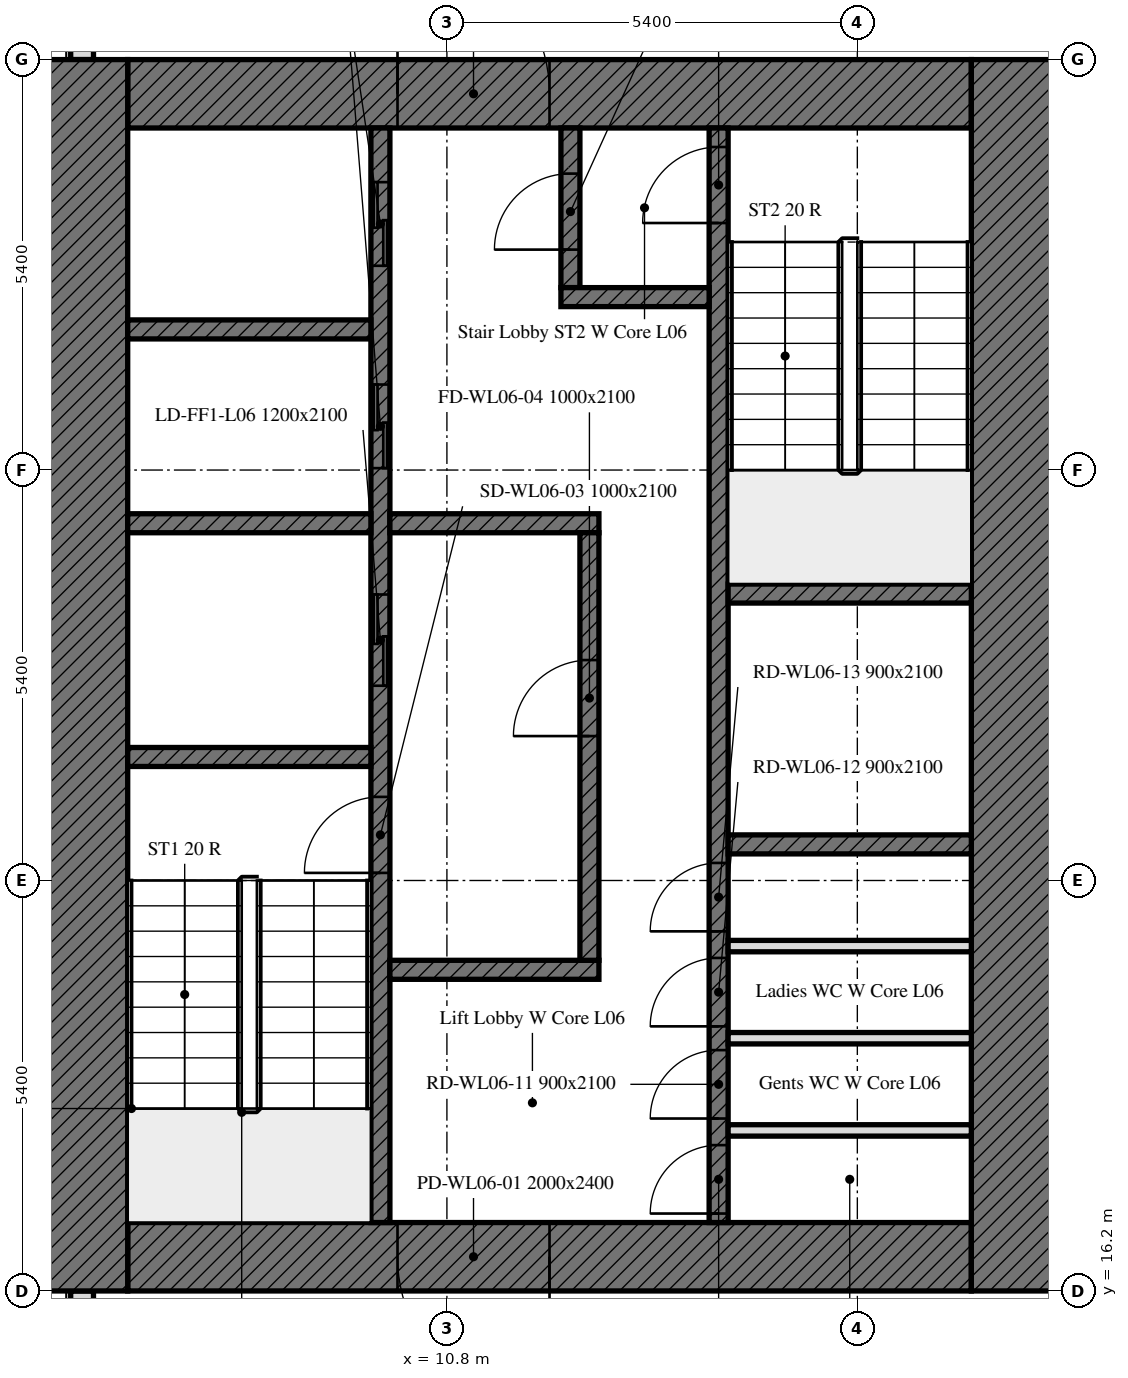
"""IFC4 building model, lengths in metres.
Left out: names, types, materials, properties, quantities, classifications, styles, units other than length and angle.
Written with IfcOpenShell. Run it as: python <this file> out.ifc"""

import sys

from ifc_helpers import new_model, si_unit, direction, frame, frame_2d, origin, place, context, subcontext, project, spatial, rectangle, extrude, element, fill, save


model = new_model("IFC4")
c1 = context("Model", 3, precision=1e-05, world=origin(), true_north=direction((0.0, 1.0)))
c2 = subcontext(c1, "Body", "Model", "MODEL_VIEW")
j1 = project(units=[si_unit("LENGTHUNIT", "METRE"), si_unit("PLANEANGLEUNIT", "RADIAN")], contexts=[c1])
p1 = place(None, origin())
s1 = spatial("IfcSite", under=j1, at=p1, CompositionType="ELEMENT")
p2 = place(p1, origin())
s2 = spatial("IfcBuilding", under=s1, at=p2, CompositionType="ELEMENT")
p3 = place(p2, frame((0.0, 0.0, 33.6)))
s3 = spatial("IfcBuildingStorey", under=s2, at=p3, CompositionType="ELEMENT", Elevation=33.6)
p4 = place(p3, frame((6.0, 37.614, 0.0), z_axis=(0.0, 0.0, 1.0), x_axis=(0.0, -1.0, 0.0)))
e1 = element("IfcWall", 1, at=p4, inside=s3, PredefinedType="SOLIDWALL", context=c2, shape_type="SweptSolid", body=[
    extrude(rectangle(XDim=5.214, YDim=0.3, at=frame_2d((2.607, 0.0))), origin(), (0.0, 0.0, 1.0), 3.5),
])
p5 = place(p4, frame((0.714, 0.0, 0.0)))
e2 = element("IfcOpeningElement", 2, at=p5, cuts=e1, PredefinedType="OPENING", context=c2, shape_type="SweptSolid", body=[
    extrude(rectangle(XDim=1.2, YDim=2.4, at=frame_2d((0.6, 1.2))), frame((0.0, 0.16, 0.0), z_axis=(0.0, -1.0, 0.0), x_axis=(1.0, 0.0, 0.0)), (0.0, 0.0, 1.0), 0.32),
])
p6 = place(p3, frame((6.0, 16.2, 0.0), z_axis=(0.0, 0.0, 1.0), x_axis=(0.0, -1.0, 0.0)))
e3 = element("IfcWall", 3, at=p6, inside=s3, PredefinedType="SOLIDWALL", context=c2, shape_type="SweptSolid", body=[
    extrude(rectangle(XDim=10.614, YDim=0.3, at=frame_2d((5.307, 0.0))), origin(), (0.0, 0.0, 1.0), 3.5),
])
p7 = place(p6, frame((3.3, 0.0, 0.0)))
e4 = element("IfcOpeningElement", 4, at=p7, cuts=e3, PredefinedType="OPENING", context=c2, shape_type="SweptSolid", body=[
    extrude(rectangle(XDim=1.2, YDim=2.4, at=frame_2d((0.6, 1.2))), frame((0.0, 0.16, 0.0), z_axis=(0.0, -1.0, 0.0), x_axis=(1.0, 0.0, 0.0)), (0.0, 0.0, 1.0), 0.32),
])
p8 = place(p6, frame((7.2, 0.0, 0.0)))
e5 = element("IfcOpeningElement", 5, at=p8, cuts=e3, PredefinedType="OPENING", context=c2, shape_type="SweptSolid", body=[
    extrude(rectangle(XDim=1.8, YDim=2.4, at=frame_2d((0.9, 1.2))), frame((0.0, 0.16, 0.0), z_axis=(0.0, -1.0, 0.0), x_axis=(1.0, 0.0, 0.0)), (0.0, 0.0, 1.0), 0.32),
])
p9 = place(p3, frame((17.7, 16.65, 0.0), z_axis=(0.0, 0.0, 1.0), x_axis=(-1.0, 0.0, 0.0)))
e6 = element("IfcWall", 6, at=p9, inside=s3, PredefinedType="SOLIDWALL", context=c2, shape_type="SweptSolid", body=[
    extrude(rectangle(XDim=11.1, YDim=0.9, at=frame_2d((5.55, 0.0))), origin(), (0.0, 0.0, 1.0), 3.5),
])
p10 = place(p9, frame((5.55, 0.0, 0.0)))
e7 = element("IfcOpeningElement", 7, at=p10, cuts=e6, PredefinedType="OPENING", context=c2, shape_type="SweptSolid", body=[
    extrude(rectangle(XDim=2.0, YDim=2.4, at=frame_2d((1.0, 1.2))), frame((0.0, 0.45, 0.0), z_axis=(0.0, -1.0, 0.0), x_axis=(1.0, 0.0, 0.0)), (0.0, 0.0, 1.0), 0.9),
])
p11 = place(p3, frame((6.6, 31.95, 0.0), z_axis=(0.0, 0.0, 1.0), x_axis=(1.0, 0.0, 0.0)))
e8 = element("IfcWall", 8, at=p11, inside=s3, PredefinedType="SOLIDWALL", context=c2, shape_type="SweptSolid", body=[
    extrude(rectangle(XDim=11.1, YDim=0.9, at=frame_2d((5.55, 0.0))), origin(), (0.0, 0.0, 1.0), 3.5),
])
p12 = place(p11, frame((3.55, 0.0, 0.0)))
e9 = element("IfcOpeningElement", 9, at=p12, cuts=e8, PredefinedType="OPENING", context=c2, shape_type="SweptSolid", body=[
    extrude(rectangle(XDim=2.0, YDim=2.4, at=frame_2d((1.0, 1.2))), frame((0.0, 0.45, 0.0), z_axis=(0.0, -1.0, 0.0), x_axis=(1.0, 0.0, 0.0)), (0.0, 0.0, 1.0), 0.9),
])
for number, where, z_axis, x_axis in (
    (10, (6.0, 16.2, 0.0), (0.0, 0.0, 1.0), (0.0, 1.0, 0.0)),
    (11, (18.3, 32.4, 0.0), (0.0, 0.0, 1.0), (0.0, -1.0, 0.0)),
):
    element("IfcWall", number, at=place(p3, frame(where, z_axis=z_axis, x_axis=x_axis)), inside=s3, PredefinedType="SOLIDWALL", context=c2, shape_type="SweptSolid", body=[
        extrude(rectangle(XDim=16.2, YDim=1.2, at=frame_2d((8.1, 0.0))), origin(), (0.0, 0.0, 1.0), 3.5),
    ])
p13 = place(p3, frame((9.925, 17.1, 0.0), z_axis=(0.0, 0.0, 1.0), x_axis=(0.0, 1.0, 0.0)))
e12 = element("IfcWall", 12, at=p13, inside=s3, PredefinedType="SOLIDWALL", context=c2, shape_type="SweptSolid", body=[
    extrude(rectangle(XDim=14.4, YDim=0.25, at=frame_2d((7.2, 0.0))), origin(), (0.0, 0.0, 1.0), 3.5),
])
p14 = place(p13, frame((4.6, 0.0, 0.0)))
e13 = element("IfcOpeningElement", 13, at=p14, cuts=e12, PredefinedType="OPENING", context=c2, shape_type="SweptSolid", body=[
    extrude(rectangle(XDim=1.0, YDim=2.1, at=frame_2d((0.5, 1.05))), frame((0.0, 0.125, 0.0), z_axis=(0.0, -1.0, 0.0), x_axis=(1.0, 0.0, 0.0)), (0.0, 0.0, 1.0), 0.25),
])
p15 = place(p13, frame((7.062, 0.0, 0.0)))
e14 = element("IfcOpeningElement", 14, at=p15, cuts=e12, PredefinedType="OPENING", context=c2, shape_type="SweptSolid", body=[
    extrude(rectangle(XDim=1.2, YDim=2.1, at=frame_2d((0.6, 1.05))), frame((0.0, 0.125, 0.0), z_axis=(0.0, -1.0, 0.0), x_axis=(1.0, 0.0, 0.0)), (0.0, 0.0, 1.0), 0.25),
])
p16 = place(p13, frame((9.925, 0.0, 0.0)))
e15 = element("IfcOpeningElement", 15, at=p16, cuts=e12, PredefinedType="OPENING", context=c2, shape_type="SweptSolid", body=[
    extrude(rectangle(XDim=1.1, YDim=2.1, at=frame_2d((0.55, 1.05))), frame((0.0, 0.125, 0.0), z_axis=(0.0, -1.0, 0.0), x_axis=(1.0, 0.0, 0.0)), (0.0, 0.0, 1.0), 0.25),
])
p17 = place(p13, frame((12.587, 0.0, 0.0)))
e16 = element("IfcOpeningElement", 16, at=p17, cuts=e12, PredefinedType="OPENING", context=c2, shape_type="SweptSolid", body=[
    extrude(rectangle(XDim=1.1, YDim=2.1, at=frame_2d((0.55, 1.05))), frame((0.0, 0.125, 0.0), z_axis=(0.0, -1.0, 0.0), x_axis=(1.0, 0.0, 0.0)), (0.0, 0.0, 1.0), 0.25),
])
p18 = place(p3, frame((14.375, 17.1, 0.0), z_axis=(0.0, 0.0, 1.0), x_axis=(0.0, 1.0, 0.0)))
e17 = element("IfcWall", 17, at=p18, inside=s3, PredefinedType="SOLIDWALL", context=c2, shape_type="SweptSolid", body=[
    extrude(rectangle(XDim=14.4, YDim=0.25, at=frame_2d((7.2, 0.0))), origin(), (0.0, 0.0, 1.0), 3.5),
])
p19 = place(p18, frame((13.15, 0.0, 0.0)))
e18 = element("IfcOpeningElement", 18, at=p19, cuts=e17, PredefinedType="OPENING", context=c2, shape_type="SweptSolid", body=[
    extrude(rectangle(XDim=1.0, YDim=2.1, at=frame_2d((0.5, 1.05))), frame((0.0, 0.125, 0.0), z_axis=(0.0, -1.0, 0.0), x_axis=(1.0, 0.0, 0.0)), (0.0, 0.0, 1.0), 0.25),
])
p20 = place(p18, frame((0.118, 0.0, 0.0)))
e19 = element("IfcOpeningElement", 19, at=p20, cuts=e17, PredefinedType="OPENING", context=c2, shape_type="SweptSolid", body=[
    extrude(rectangle(XDim=0.9, YDim=2.1, at=frame_2d((0.45, 1.05))), frame((0.0, 0.125, 0.0), z_axis=(0.0, -1.0, 0.0), x_axis=(1.0, 0.0, 0.0)), (0.0, 0.0, 1.0), 0.25),
])
p21 = place(p18, frame((1.368, 0.0, 0.0)))
e20 = element("IfcOpeningElement", 20, at=p21, cuts=e17, PredefinedType="OPENING", context=c2, shape_type="SweptSolid", body=[
    extrude(rectangle(XDim=0.9, YDim=2.1, at=frame_2d((0.45, 1.05))), frame((0.0, 0.125, 0.0), z_axis=(0.0, -1.0, 0.0), x_axis=(1.0, 0.0, 0.0)), (0.0, 0.0, 1.0), 0.25),
])
p22 = place(p18, frame((2.581, 0.0, 0.0)))
e21 = element("IfcOpeningElement", 21, at=p22, cuts=e17, PredefinedType="OPENING", context=c2, shape_type="SweptSolid", body=[
    extrude(rectangle(XDim=0.9, YDim=2.1, at=frame_2d((0.45, 1.05))), frame((0.0, 0.125, 0.0), z_axis=(0.0, -1.0, 0.0), x_axis=(1.0, 0.0, 0.0)), (0.0, 0.0, 1.0), 0.25),
])
p23 = place(p18, frame((3.831, 0.0, 0.0)))
e22 = element("IfcOpeningElement", 22, at=p23, cuts=e17, PredefinedType="OPENING", context=c2, shape_type="SweptSolid", body=[
    extrude(rectangle(XDim=0.9, YDim=2.1, at=frame_2d((0.45, 1.05))), frame((0.0, 0.125, 0.0), z_axis=(0.0, -1.0, 0.0), x_axis=(1.0, 0.0, 0.0)), (0.0, 0.0, 1.0), 0.25),
])
for number, where, z_axis, x_axis in (
    (23, (6.6, 23.225, 0.0), (0.0, 0.0, 1.0), (1.0, 0.0, 0.0)),
    (24, (14.5, 25.375, 0.0), (0.0, 0.0, 1.0), (1.0, 0.0, 0.0)),
    (25, (14.5, 22.075, 0.0), (0.0, 0.0, 1.0), (1.0, 0.0, 0.0)),
    (26, (6.6, 26.3, 0.0), (0.0, 0.0, 1.0), (1.0, 0.0, 0.0)),
):
    element("IfcWall", number, at=place(p3, frame(where, z_axis=z_axis, x_axis=x_axis)), inside=s3, PredefinedType="SOLIDWALL", context=c2, shape_type="SweptSolid", body=[
        extrude(rectangle(XDim=3.2, YDim=0.25, at=frame_2d((1.6, 0.0))), origin(), (0.0, 0.0, 1.0), 3.5),
    ])
for number, where, z_axis, x_axis in (
    (27, (10.05, 26.3, 0.0), (0.0, 0.0, 1.0), (1.0, 0.0, 0.0)),
    (28, (10.05, 20.425, 0.0), (0.0, 0.0, 1.0), (1.0, 0.0, 0.0)),
):
    element("IfcWall", number, at=place(p3, frame(where, z_axis=z_axis, x_axis=x_axis)), inside=s3, PredefinedType="SOLIDWALL", context=c2, shape_type="SweptSolid", body=[
        extrude(rectangle(XDim=2.75, YDim=0.25, at=frame_2d((1.375, 0.0))), origin(), (0.0, 0.0, 1.0), 3.5),
    ])
p24 = place(p3, frame((12.425, 29.4, 0.0), z_axis=(0.0, 0.0, 1.0), x_axis=(0.0, 1.0, 0.0)))
e29 = element("IfcWall", 29, at=p24, inside=s3, PredefinedType="SOLIDWALL", context=c2, shape_type="SweptSolid", body=[
    extrude(rectangle(XDim=2.1, YDim=0.25, at=frame_2d((1.05, 0.0))), origin(), (0.0, 0.0, 1.0), 3.5),
])
p25 = place(p24, frame((0.5, 0.0, 0.0)))
e30 = element("IfcOpeningElement", 30, at=p25, cuts=e29, PredefinedType="OPENING", context=c2, shape_type="SweptSolid", body=[
    extrude(rectangle(XDim=1.0, YDim=2.1, at=frame_2d((0.5, 1.05))), frame((0.0, 0.125, 0.0), z_axis=(0.0, -1.0, 0.0), x_axis=(1.0, 0.0, 0.0)), (0.0, 0.0, 1.0), 0.25),
])
p26 = place(p3, frame((12.3, 29.275, 0.0), z_axis=(0.0, 0.0, 1.0), x_axis=(1.0, 0.0, 0.0)))
e31 = element("IfcWall", 31, at=p26, inside=s3, PredefinedType="SOLIDWALL", context=c2, shape_type="SweptSolid", body=[
    extrude(rectangle(XDim=1.95, YDim=0.25, at=frame_2d((0.975, 0.0))), origin(), (0.0, 0.0, 1.0), 3.5),
])
p27 = place(p3, frame((12.675, 20.55, 0.0), z_axis=(0.0, 0.0, 1.0), x_axis=(0.0, 1.0, 0.0)))
e32 = element("IfcWall", 32, at=p27, inside=s3, PredefinedType="SOLIDWALL", context=c2, shape_type="SweptSolid", body=[
    extrude(rectangle(XDim=5.625, YDim=0.25, at=frame_2d((2.812, 0.0))), origin(), (0.0, 0.0, 1.0), 3.5),
])
p28 = place(p27, frame((2.95, 0.0, 0.0)))
e33 = element("IfcOpeningElement", 33, at=p28, cuts=e32, PredefinedType="OPENING", context=c2, shape_type="SweptSolid", body=[
    extrude(rectangle(XDim=1.0, YDim=2.1, at=frame_2d((0.5, 1.05))), frame((0.0, 0.125, 0.0), z_axis=(0.0, -1.0, 0.0), x_axis=(1.0, 0.0, 0.0)), (0.0, 0.0, 1.0), 0.25),
])
p29 = place(p3, frame((6.6, 28.85, 0.0), z_axis=(0.0, 0.0, 1.0), x_axis=(1.0, 0.0, 0.0)))
e34 = element("IfcWall", 34, at=p29, inside=s3, PredefinedType="SOLIDWALL", context=c2, shape_type="SweptSolid", body=[
    extrude(rectangle(XDim=3.2, YDim=0.25, at=frame_2d((1.6, 0.0))), origin(), (0.0, 0.0, 1.0), 3.5),
])
for number, where, z_axis, x_axis in (
    (35, (14.5, 18.312, 0.0), (0.0, 0.0, 1.0), (1.0, 0.0, 0.0)),
    (36, (14.5, 19.525, 0.0), (0.0, 0.0, 1.0), (1.0, 0.0, 0.0)),
    (37, (14.5, 20.737, 0.0), (0.0, 0.0, 1.0), (1.0, 0.0, 0.0)),
):
    element("IfcWall", number, at=place(p3, frame(where, z_axis=z_axis, x_axis=x_axis)), inside=s3, PredefinedType="PARTITIONING", context=c2, shape_type="SweptSolid", body=[
        extrude(rectangle(XDim=3.2, YDim=0.15, at=frame_2d((1.6, 0.0))), origin(), (0.0, 0.0, 1.0), 3.5),
    ])
p30 = place(p10, origin())
e38 = element("IfcDoor", 38, at=p30, inside=s3, OperationType="DOUBLE_DOOR_SINGLE_SWING", PredefinedType="DOOR", context=c2, shape_type="SweptSolid", body=[
    extrude(rectangle(XDim=2.0, YDim=2.4, at=frame_2d((1.0, 1.2))), frame((0.0, 0.025, 0.0), z_axis=(0.0, -1.0, 0.0), x_axis=(1.0, 0.0, 0.0)), (0.0, 0.0, 1.0), 0.05),
])
fill(e7, e38)
p31 = place(p12, origin())
e39 = element("IfcDoor", 39, at=p31, inside=s3, OperationType="DOUBLE_DOOR_SINGLE_SWING", PredefinedType="DOOR", context=c2, shape_type="SweptSolid", body=[
    extrude(rectangle(XDim=2.0, YDim=2.4, at=frame_2d((1.0, 1.2))), frame((0.0, 0.025, 0.0), z_axis=(0.0, -1.0, 0.0), x_axis=(1.0, 0.0, 0.0)), (0.0, 0.0, 1.0), 0.05),
])
fill(e9, e39)
p32 = place(p14, origin())
e40 = element("IfcDoor", 40, at=p32, inside=s3, OperationType="SINGLE_SWING_LEFT", PredefinedType="DOOR", context=c2, shape_type="SweptSolid", body=[
    extrude(rectangle(XDim=1.0, YDim=2.1, at=frame_2d((0.5, 1.05))), frame((0.0, 0.025, 0.0), z_axis=(0.0, -1.0, 0.0), x_axis=(1.0, 0.0, 0.0)), (0.0, 0.0, 1.0), 0.05),
])
fill(e13, e40)
p33 = place(p28, origin())
e41 = element("IfcDoor", 41, at=p33, inside=s3, OperationType="SINGLE_SWING_LEFT", PredefinedType="DOOR", context=c2, shape_type="SweptSolid", body=[
    extrude(rectangle(XDim=1.0, YDim=2.1, at=frame_2d((0.5, 1.05))), frame((0.0, 0.025, 0.0), z_axis=(0.0, -1.0, 0.0), x_axis=(1.0, 0.0, 0.0)), (0.0, 0.0, 1.0), 0.05),
])
fill(e33, e41)
p34 = place(p19, origin())
e42 = element("IfcDoor", 42, at=p34, inside=s3, OperationType="SINGLE_SWING_LEFT", PredefinedType="DOOR", context=c2, shape_type="SweptSolid", body=[
    extrude(rectangle(XDim=1.0, YDim=2.1, at=frame_2d((0.5, 1.05))), frame((0.0, 0.025, 0.0), z_axis=(0.0, -1.0, 0.0), x_axis=(1.0, 0.0, 0.0)), (0.0, 0.0, 1.0), 0.05),
])
fill(e18, e42)
p35 = place(p25, origin())
e43 = element("IfcDoor", 43, at=p35, inside=s3, OperationType="SINGLE_SWING_LEFT", PredefinedType="DOOR", context=c2, shape_type="SweptSolid", body=[
    extrude(rectangle(XDim=1.0, YDim=2.1, at=frame_2d((0.5, 1.05))), frame((0.0, 0.025, 0.0), z_axis=(0.0, -1.0, 0.0), x_axis=(1.0, 0.0, 0.0)), (0.0, 0.0, 1.0), 0.05),
])
fill(e30, e43)
p36 = place(p15, origin())
e44 = element("IfcDoor", 44, at=p36, inside=s3, OperationType="DOUBLE_DOOR_SLIDING", PredefinedType="DOOR", context=c2, shape_type="SweptSolid", body=[
    extrude(rectangle(XDim=1.2, YDim=2.1, at=frame_2d((0.6, 1.05))), frame((0.0, 0.025, 0.0), z_axis=(0.0, -1.0, 0.0), x_axis=(1.0, 0.0, 0.0)), (0.0, 0.0, 1.0), 0.05),
])
fill(e14, e44)
p37 = place(p16, origin())
e45 = element("IfcDoor", 45, at=p37, inside=s3, OperationType="DOUBLE_DOOR_SLIDING", PredefinedType="DOOR", context=c2, shape_type="SweptSolid", body=[
    extrude(rectangle(XDim=1.1, YDim=2.1, at=frame_2d((0.55, 1.05))), frame((0.0, 0.025, 0.0), z_axis=(0.0, -1.0, 0.0), x_axis=(1.0, 0.0, 0.0)), (0.0, 0.0, 1.0), 0.05),
])
fill(e15, e45)
p38 = place(p17, origin())
e46 = element("IfcDoor", 46, at=p38, inside=s3, OperationType="DOUBLE_DOOR_SLIDING", PredefinedType="DOOR", context=c2, shape_type="SweptSolid", body=[
    extrude(rectangle(XDim=1.1, YDim=2.1, at=frame_2d((0.55, 1.05))), frame((0.0, 0.025, 0.0), z_axis=(0.0, -1.0, 0.0), x_axis=(1.0, 0.0, 0.0)), (0.0, 0.0, 1.0), 0.05),
])
fill(e16, e46)
p39 = place(p20, origin())
e47 = element("IfcDoor", 47, at=p39, inside=s3, OperationType="SINGLE_SWING_LEFT", PredefinedType="DOOR", context=c2, shape_type="SweptSolid", body=[
    extrude(rectangle(XDim=0.9, YDim=2.1, at=frame_2d((0.45, 1.05))), frame((0.0, 0.025, 0.0), z_axis=(0.0, -1.0, 0.0), x_axis=(1.0, 0.0, 0.0)), (0.0, 0.0, 1.0), 0.05),
])
fill(e19, e47)
p40 = place(p21, origin())
e48 = element("IfcDoor", 48, at=p40, inside=s3, OperationType="SINGLE_SWING_LEFT", PredefinedType="DOOR", context=c2, shape_type="SweptSolid", body=[
    extrude(rectangle(XDim=0.9, YDim=2.1, at=frame_2d((0.45, 1.05))), frame((0.0, 0.025, 0.0), z_axis=(0.0, -1.0, 0.0), x_axis=(1.0, 0.0, 0.0)), (0.0, 0.0, 1.0), 0.05),
])
fill(e20, e48)
p41 = place(p22, origin())
e49 = element("IfcDoor", 49, at=p41, inside=s3, OperationType="SINGLE_SWING_LEFT", PredefinedType="DOOR", context=c2, shape_type="SweptSolid", body=[
    extrude(rectangle(XDim=0.9, YDim=2.1, at=frame_2d((0.45, 1.05))), frame((0.0, 0.025, 0.0), z_axis=(0.0, -1.0, 0.0), x_axis=(1.0, 0.0, 0.0)), (0.0, 0.0, 1.0), 0.05),
])
fill(e21, e49)
p42 = place(p23, origin())
e50 = element("IfcDoor", 50, at=p42, inside=s3, OperationType="SINGLE_SWING_LEFT", PredefinedType="DOOR", context=c2, shape_type="SweptSolid", body=[
    extrude(rectangle(XDim=0.9, YDim=2.1, at=frame_2d((0.45, 1.05))), frame((0.0, 0.025, 0.0), z_axis=(0.0, -1.0, 0.0), x_axis=(1.0, 0.0, 0.0)), (0.0, 0.0, 1.0), 0.05),
])
fill(e22, e50)
save(model, sys.argv[1])
